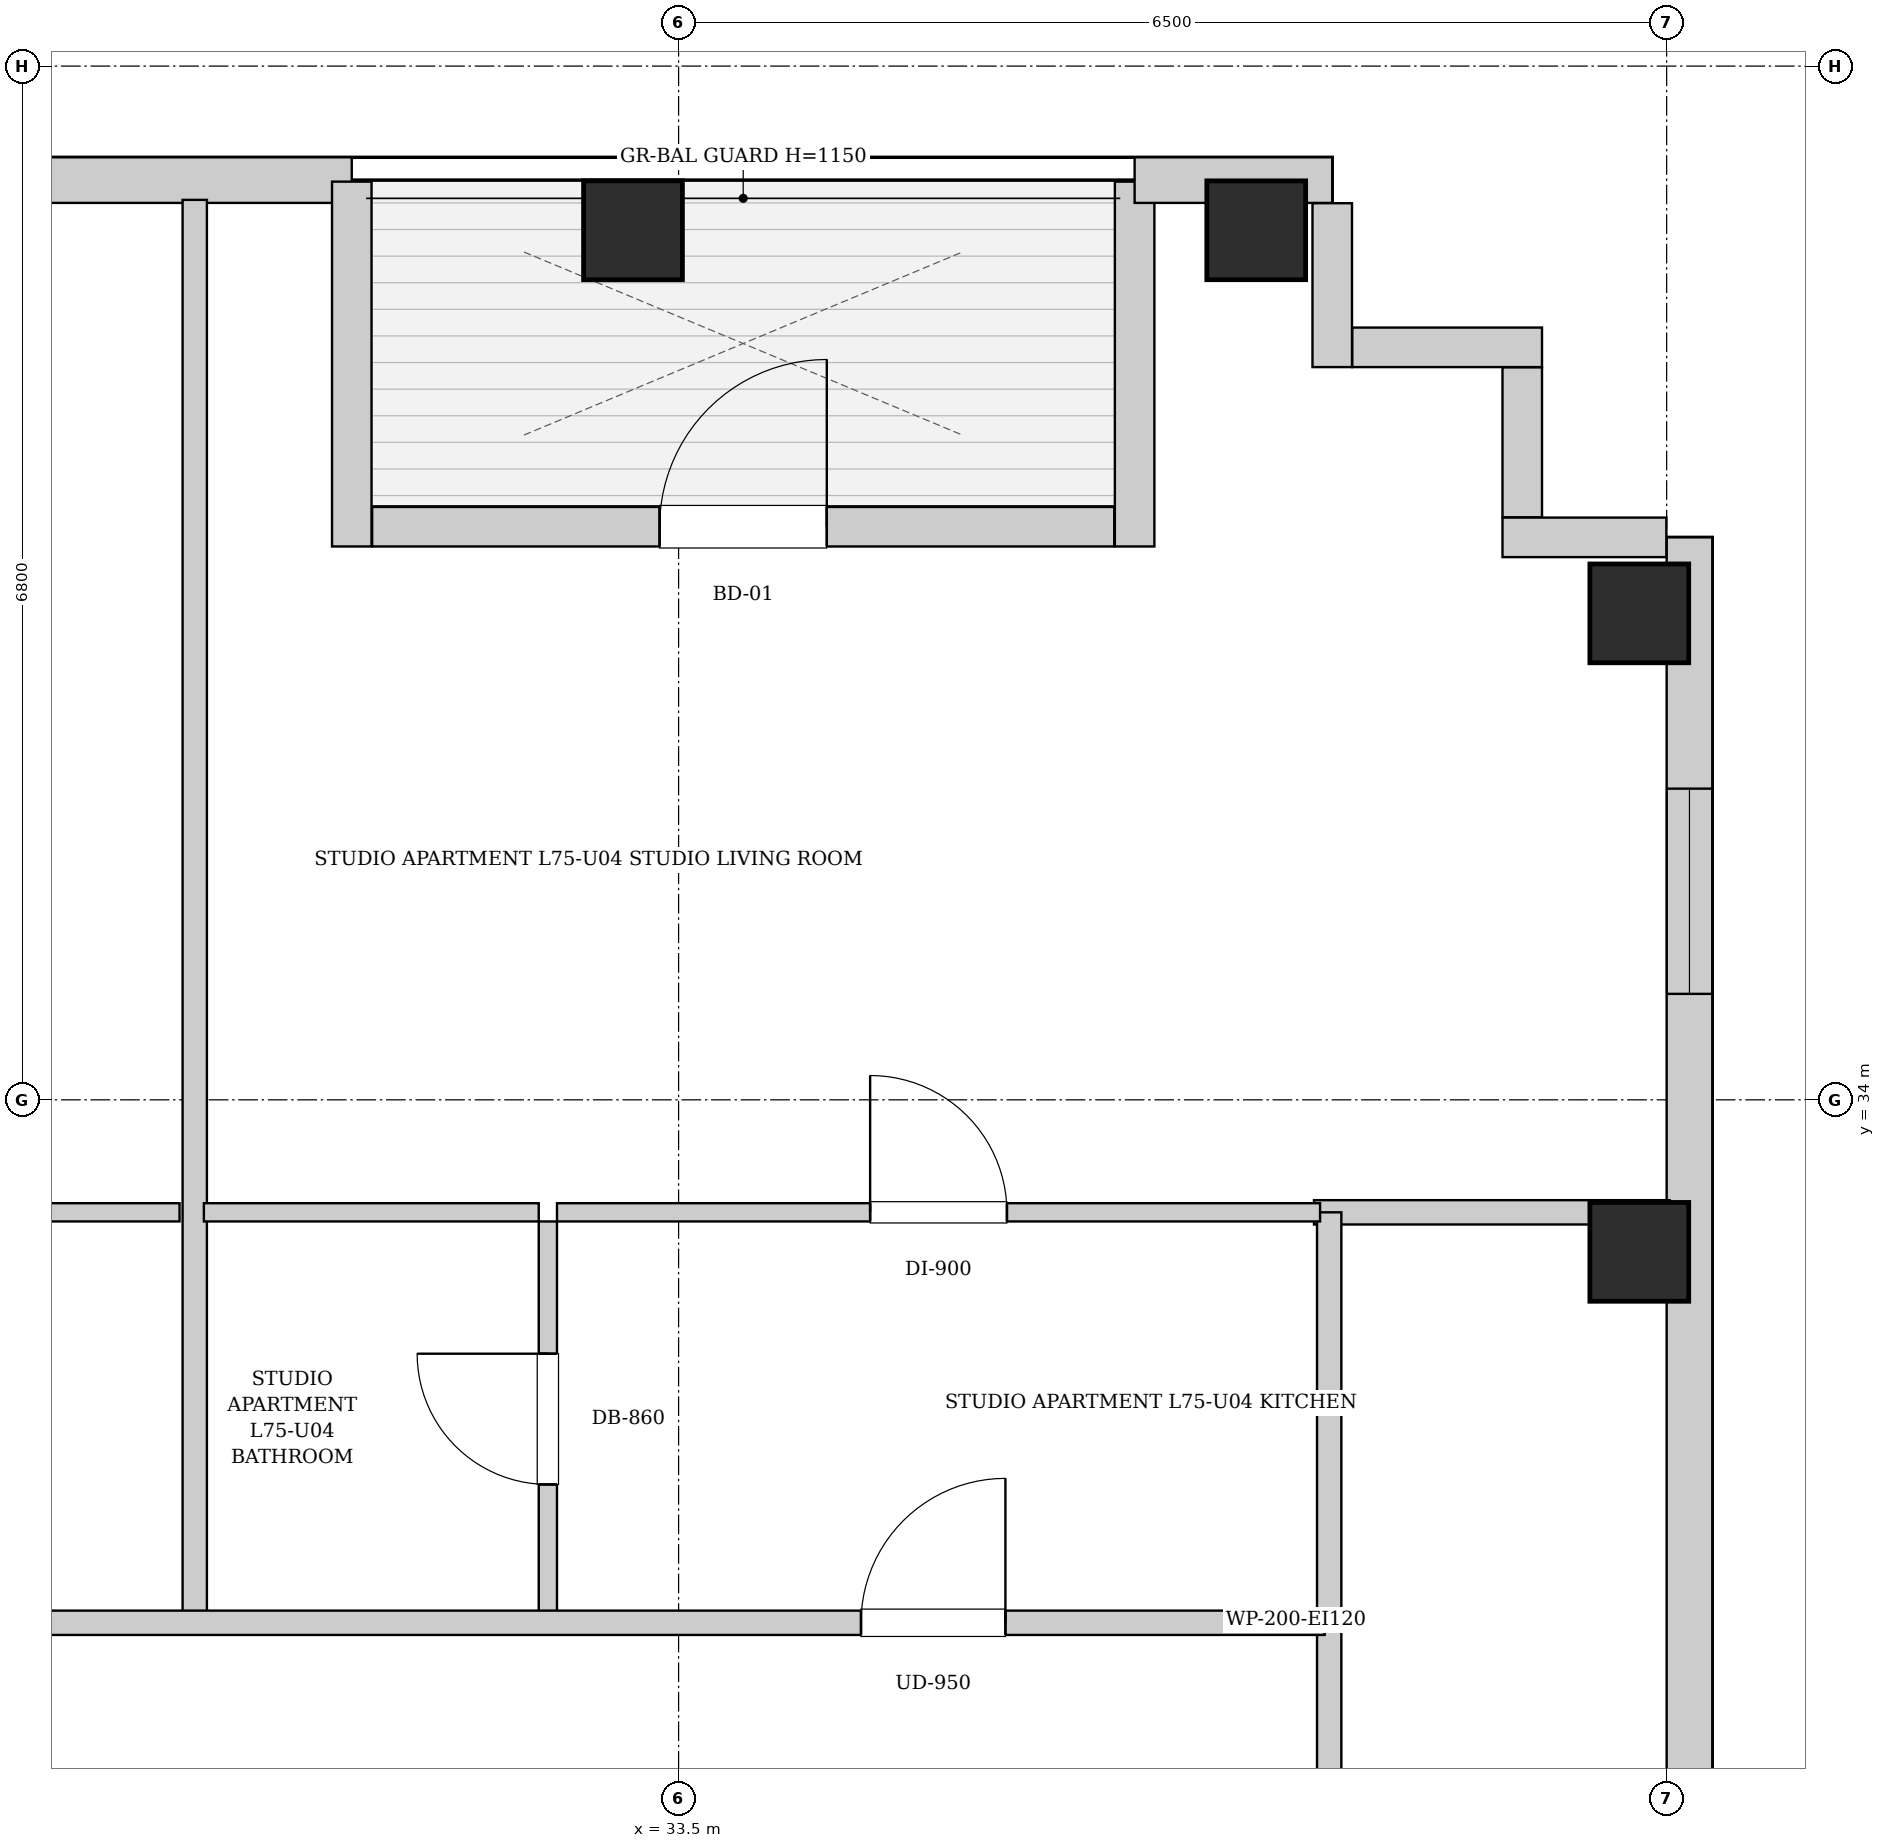
"""IFC4 building model, lengths in metres.
Left out: names, types, materials, properties, quantities, classifications, styles, units other than length and angle.
Written with IfcOpenShell. Run it as: python <this file> out.ifc"""

import sys

from ifc_helpers import new_model, si_unit, direction, frame, frame_2d, origin, origin_2d, place, context, subcontext, project, spatial, rectangle, extrude, element, fill, save


model = new_model("IFC4")
c1 = context("Model", 3, precision=1e-05, world=origin(), true_north=direction((0.0, 1.0)))
c2 = subcontext(c1, "Body", "Model", "MODEL_VIEW")
j1 = project(units=[si_unit("LENGTHUNIT", "METRE"), si_unit("PLANEANGLEUNIT", "RADIAN")], contexts=[c1])
p1 = place(None, origin())
s1 = spatial("IfcSite", under=j1, at=p1, CompositionType="ELEMENT")
p2 = place(p1, origin())
s2 = spatial("IfcBuilding", under=s1, at=p2, CompositionType="ELEMENT")
p3 = place(p2, frame((0.0, 0.0, 258.1)))
s3 = spatial("IfcBuildingStorey", under=s2, at=p3, CompositionType="ELEMENT", Elevation=258.1)
for number, where, z_axis, x_axis in (
    (1, (33.2, 39.72, 0.0), (0.0, 0.0, 1.0), (1.0, 0.0, 0.0)),
    (2, (37.3, 39.72, 0.0), (0.0, 0.0, 1.0), (1.0, 0.0, 0.0)),
    (3, (39.82, 33.0, 0.0), (0.0, 0.0, 1.0), (1.0, 0.0, 0.0)),
    (4, (39.82, 37.2, 0.0), (0.0, 0.0, 1.0), (1.0, 0.0, 0.0)),
):
    element("IfcColumn", number, at=place(p3, frame(where, z_axis=z_axis, x_axis=x_axis)), inside=s3, PredefinedType="COLUMN", context=c2, shape_type="SweptSolid", body=[
        extrude(rectangle(XDim=0.65, YDim=0.65, at=origin_2d()), origin(), (0.0, 0.0, 1.0), 3.4),
    ])
p4 = place(p3, frame((13.1, 40.05, 0.0), z_axis=(0.0, 0.0, 1.0), x_axis=(1.0, 0.0, 0.0)))
e5 = element("IfcWall", 5, at=p4, inside=s3, PredefinedType="SOLIDWALL", context=c2, shape_type="SweptSolid", body=[
    extrude(rectangle(XDim=18.25, YDim=0.3, at=frame_2d((9.125, 0.0))), origin(), (0.0, 0.0, 1.0), 3.05),
])
p5 = place(p4, frame((1.813, 0.0, 0.55)))
e6 = element("IfcOpeningElement", 6, at=p5, cuts=e5, PredefinedType="OPENING", context=c2, shape_type="SweptSolid", body=[
    extrude(rectangle(XDim=1.35, YDim=1.2, at=frame_2d((0.675, 0.6))), frame((0.0, 0.16, 0.0), z_axis=(0.0, -1.0, 0.0), x_axis=(1.0, 0.0, 0.0)), (0.0, 0.0, 1.0), 0.32),
])
p6 = place(p4, frame((5.66, 0.0, 0.55)))
e7 = element("IfcOpeningElement", 7, at=p6, cuts=e5, PredefinedType="OPENING", context=c2, shape_type="SweptSolid", body=[
    extrude(rectangle(XDim=1.35, YDim=1.2, at=frame_2d((0.675, 0.6))), frame((0.0, 0.16, 0.0), z_axis=(0.0, -1.0, 0.0), x_axis=(1.0, 0.0, 0.0)), (0.0, 0.0, 1.0), 0.32),
])
p7 = place(p4, frame((8.55, 0.0, 0.55)))
e8 = element("IfcOpeningElement", 8, at=p7, cuts=e5, PredefinedType="OPENING", context=c2, shape_type="SweptSolid", body=[
    extrude(rectangle(XDim=0.85, YDim=1.2, at=frame_2d((0.425, 0.6))), frame((0.0, 0.16, 0.0), z_axis=(0.0, -1.0, 0.0), x_axis=(1.0, 0.0, 0.0)), (0.0, 0.0, 1.0), 0.32),
])
p8 = place(p4, frame((14.4, 0.0, 0.55)))
e9 = element("IfcOpeningElement", 9, at=p8, cuts=e5, PredefinedType="OPENING", context=c2, shape_type="SweptSolid", body=[
    extrude(rectangle(XDim=1.35, YDim=1.2, at=frame_2d((0.675, 0.6))), frame((0.0, 0.16, 0.0), z_axis=(0.0, -1.0, 0.0), x_axis=(1.0, 0.0, 0.0)), (0.0, 0.0, 1.0), 0.32),
])
p9 = place(p3, frame((31.35, 40.04, 0.0), z_axis=(0.0, 0.0, 1.0), x_axis=(0.0, -1.0, 0.0)))
e10 = element("IfcWall", 10, at=p9, inside=s3, PredefinedType="SOLIDWALL", context=c2, shape_type="SweptSolid", body=[
    extrude(rectangle(XDim=2.4, YDim=0.26, at=frame_2d((1.2, 0.0))), origin(), (0.0, 0.0, 1.0), 3.05),
])
p10 = place(p3, frame((31.484, 37.77, 0.0), z_axis=(0.0, 0.0, 1.0), x_axis=(1.0, 0.0, 0.0)))
e11 = element("IfcWall", 11, at=p10, inside=s3, PredefinedType="SOLIDWALL", context=c2, shape_type="SweptSolid", body=[
    extrude(rectangle(XDim=4.882, YDim=0.26, at=frame_2d((2.441, 0.0))), origin(), (0.0, 0.0, 1.0), 3.05),
])
p11 = place(p10, frame((1.891, 0.0, 0.0)))
e12 = element("IfcOpeningElement", 12, at=p11, cuts=e11, PredefinedType="OPENING", context=c2, shape_type="SweptSolid", body=[
    extrude(rectangle(XDim=1.1, YDim=2.0, at=frame_2d((0.55, 1.0))), frame((0.0, 0.14, 0.0), z_axis=(0.0, -1.0, 0.0), x_axis=(1.0, 0.0, 0.0)), (0.0, 0.0, 1.0), 0.28),
])
p12 = place(p3, frame((36.5, 37.64, 0.0), z_axis=(0.0, 0.0, 1.0), x_axis=(0.0, 1.0, 0.0)))
e13 = element("IfcWall", 13, at=p12, inside=s3, PredefinedType="SOLIDWALL", context=c2, shape_type="SweptSolid", body=[
    extrude(rectangle(XDim=2.4, YDim=0.26, at=frame_2d((1.2, 0.0))), origin(), (0.0, 0.0, 1.0), 3.05),
])
p13 = place(p3, frame((36.5, 40.05, 0.0), z_axis=(0.0, 0.0, 1.0), x_axis=(1.0, 0.0, 0.0)))
e14 = element("IfcWall", 14, at=p13, inside=s3, PredefinedType="SOLIDWALL", context=c2, shape_type="SweptSolid", body=[
    extrude(rectangle(XDim=1.3, YDim=0.3, at=frame_2d((0.65, 0.0))), origin(), (0.0, 0.0, 1.0), 3.05),
])
p14 = place(p3, frame((40.15, 37.7, 0.0), z_axis=(0.0, 0.0, 1.0), x_axis=(0.0, -1.0, 0.0)))
e15 = element("IfcWall", 15, at=p14, inside=s3, PredefinedType="SOLIDWALL", context=c2, shape_type="SweptSolid", body=[
    extrude(rectangle(XDim=31.4, YDim=0.3, at=frame_2d((15.7, 0.0))), origin(), (0.0, 0.0, 1.0), 3.05),
])
p15 = place(p14, frame((28.396, 0.0, 0.55)))
e16 = element("IfcOpeningElement", 16, at=p15, cuts=e15, PredefinedType="OPENING", context=c2, shape_type="SweptSolid", body=[
    extrude(rectangle(XDim=1.35, YDim=1.2, at=frame_2d((0.675, 0.6))), frame((0.0, 0.16, 0.0), z_axis=(0.0, -1.0, 0.0), x_axis=(1.0, 0.0, 0.0)), (0.0, 0.0, 1.0), 0.32),
])
p16 = place(p14, frame((1.653, 0.0, 0.55)))
e17 = element("IfcOpeningElement", 17, at=p16, cuts=e15, PredefinedType="OPENING", context=c2, shape_type="SweptSolid", body=[
    extrude(rectangle(XDim=1.35, YDim=1.2, at=frame_2d((0.675, 0.6))), frame((0.0, 0.16, 0.0), z_axis=(0.0, -1.0, 0.0), x_axis=(1.0, 0.0, 0.0)), (0.0, 0.0, 1.0), 0.32),
])
p17 = place(p14, frame((19.683, 0.0, 0.55)))
e18 = element("IfcOpeningElement", 18, at=p17, cuts=e15, PredefinedType="OPENING", context=c2, shape_type="SweptSolid", body=[
    extrude(rectangle(XDim=1.35, YDim=1.2, at=frame_2d((0.675, 0.6))), frame((0.0, 0.16, 0.0), z_axis=(0.0, -1.0, 0.0), x_axis=(1.0, 0.0, 0.0)), (0.0, 0.0, 1.0), 0.32),
])
p18 = place(p14, frame((10.367, 0.0, 0.55)))
e19 = element("IfcOpeningElement", 19, at=p18, cuts=e15, PredefinedType="OPENING", context=c2, shape_type="SweptSolid", body=[
    extrude(rectangle(XDim=1.35, YDim=1.2, at=frame_2d((0.675, 0.6))), frame((0.0, 0.16, 0.0), z_axis=(0.0, -1.0, 0.0), x_axis=(1.0, 0.0, 0.0)), (0.0, 0.0, 1.0), 0.32),
])
p19 = place(p3, frame((37.8, 39.898, 0.0), z_axis=(0.0, 0.0, 1.0), x_axis=(0.0, -1.0, 0.0)))
e20 = element("IfcWall", 20, at=p19, inside=s3, PredefinedType="SOLIDWALL", context=c2, shape_type="SweptSolid", body=[
    extrude(rectangle(XDim=1.078, YDim=0.26, at=frame_2d((0.539, 0.0))), origin(), (0.0, 0.0, 1.0), 3.05),
])
p20 = place(p3, frame((37.932, 38.95, 0.0), z_axis=(0.0, 0.0, 1.0), x_axis=(1.0, 0.0, 0.0)))
e21 = element("IfcWall", 21, at=p20, inside=s3, PredefinedType="SOLIDWALL", context=c2, shape_type="SweptSolid", body=[
    extrude(rectangle(XDim=1.248, YDim=0.26, at=frame_2d((0.624, 0.0))), origin(), (0.0, 0.0, 1.0), 3.05),
])
p21 = place(p3, frame((39.05, 38.818, 0.0), z_axis=(0.0, 0.0, 1.0), x_axis=(0.0, -1.0, 0.0)))
e22 = element("IfcWall", 22, at=p21, inside=s3, PredefinedType="SOLIDWALL", context=c2, shape_type="SweptSolid", body=[
    extrude(rectangle(XDim=0.986, YDim=0.26, at=frame_2d((0.493, 0.0))), origin(), (0.0, 0.0, 1.0), 3.05),
])
p22 = place(p3, frame((38.92, 37.7, 0.0), z_axis=(0.0, 0.0, 1.0), x_axis=(1.0, 0.0, 0.0)))
e23 = element("IfcWall", 23, at=p22, inside=s3, PredefinedType="SOLIDWALL", context=c2, shape_type="SweptSolid", body=[
    extrude(rectangle(XDim=1.078, YDim=0.26, at=frame_2d((0.539, 0.0))), origin(), (0.0, 0.0, 1.0), 3.05),
])
p23 = place(p3, frame((37.78, 28.98, 0.0), z_axis=(0.0, 0.0, 1.0), x_axis=(0.0, 1.0, 0.0)))
e24 = element("IfcWall", 24, at=p23, inside=s3, PredefinedType="PARTITIONING", context=c2, shape_type="SweptSolid", body=[
    extrude(rectangle(XDim=1.58, YDim=0.16, at=frame_2d((0.79, 0.0))), origin(), (0.0, 0.0, 1.0), 3.05),
])
p24 = place(p3, frame((26.7, 33.26, 0.0), z_axis=(0.0, 0.0, 1.0), x_axis=(1.0, 0.0, 0.0)))
e25 = element("IfcWall", 25, at=p24, inside=s3, PredefinedType="PARTITIONING", context=c2, shape_type="SweptSolid", body=[
    extrude(rectangle(XDim=3.517, YDim=0.12, at=frame_2d((1.759, 0.0))), origin(), (0.0, 0.0, 1.0), 3.05),
])
p25 = place(p24, frame((1.308, 0.0, 0.0)))
e26 = element("IfcOpeningElement", 26, at=p25, cuts=e25, PredefinedType="OPENING", context=c2, shape_type="SweptSolid", body=[
    extrude(rectangle(XDim=0.9, YDim=2.05, at=frame_2d((0.45, 1.025))), frame((0.0, 0.07, 0.0), z_axis=(0.0, -1.0, 0.0), x_axis=(1.0, 0.0, 0.0)), (0.0, 0.0, 1.0), 0.14),
])
p26 = place(p3, frame((37.68, 33.26, 0.0), z_axis=(0.0, 0.0, 1.0), x_axis=(1.0, 0.0, 0.0)))
e27 = element("IfcWall", 27, at=p26, inside=s3, PredefinedType="PARTITIONING", context=c2, shape_type="SweptSolid", body=[
    extrude(rectangle(XDim=2.34, YDim=0.16, at=frame_2d((1.17, 0.0))), origin(), (0.0, 0.0, 1.0), 3.05),
])
p27 = place(p3, frame((37.78, 30.6, 0.0), z_axis=(0.0, 0.0, 1.0), x_axis=(0.0, 1.0, 0.0)))
e28 = element("IfcWall", 28, at=p27, inside=s3, PredefinedType="PARTITIONING", context=c2, shape_type="SweptSolid", body=[
    extrude(rectangle(XDim=2.66, YDim=0.16, at=frame_2d((1.33, 0.0))), origin(), (0.0, 0.0, 1.0), 3.05),
])
p28 = place(p3, frame((30.317, 30.6, 0.0), z_axis=(0.0, 0.0, 1.0), x_axis=(0.0, 1.0, 0.0)))
e29 = element("IfcWall", 29, at=p28, inside=s3, PredefinedType="PARTITIONING", context=c2, shape_type="SweptSolid", body=[
    extrude(rectangle(XDim=9.32, YDim=0.16, at=frame_2d((4.66, 0.0))), origin(), (0.0, 0.0, 1.0), 3.05),
])
p29 = place(p3, frame((32.64, 30.6, 0.0), z_axis=(0.0, 0.0, 1.0), x_axis=(0.0, 1.0, 0.0)))
e30 = element("IfcWall", 30, at=p29, inside=s3, PredefinedType="PARTITIONING", context=c2, shape_type="SweptSolid", body=[
    extrude(rectangle(XDim=2.6, YDim=0.12, at=frame_2d((1.3, 0.0))), origin(), (0.0, 0.0, 1.0), 3.05),
])
p30 = place(p29, frame((0.87, 0.0, 0.0)))
e31 = element("IfcOpeningElement", 31, at=p30, cuts=e30, PredefinedType="OPENING", context=c2, shape_type="SweptSolid", body=[
    extrude(rectangle(XDim=0.86, YDim=2.05, at=frame_2d((0.43, 1.025))), frame((0.0, 0.07, 0.0), z_axis=(0.0, -1.0, 0.0), x_axis=(1.0, 0.0, 0.0)), (0.0, 0.0, 1.0), 0.14),
])
p31 = place(p3, frame((30.377, 33.26, 0.0), z_axis=(0.0, 0.0, 1.0), x_axis=(1.0, 0.0, 0.0)))
e32 = element("IfcWall", 32, at=p31, inside=s3, PredefinedType="PARTITIONING", context=c2, shape_type="SweptSolid", body=[
    extrude(rectangle(XDim=2.203, YDim=0.12, at=frame_2d((1.102, 0.0))), origin(), (0.0, 0.0, 1.0), 3.05),
])
p32 = place(p3, frame((32.7, 33.26, 0.0), z_axis=(0.0, 0.0, 1.0), x_axis=(1.0, 0.0, 0.0)))
e33 = element("IfcWall", 33, at=p32, inside=s3, PredefinedType="PARTITIONING", context=c2, shape_type="SweptSolid", body=[
    extrude(rectangle(XDim=5.02, YDim=0.12, at=frame_2d((2.51, 0.0))), origin(), (0.0, 0.0, 1.0), 3.05),
])
p33 = place(p32, frame((2.06, 0.0, 0.0)))
e34 = element("IfcOpeningElement", 34, at=p33, cuts=e33, PredefinedType="OPENING", context=c2, shape_type="SweptSolid", body=[
    extrude(rectangle(XDim=0.9, YDim=2.05, at=frame_2d((0.45, 1.025))), frame((0.0, 0.07, 0.0), z_axis=(0.0, -1.0, 0.0), x_axis=(1.0, 0.0, 0.0)), (0.0, 0.0, 1.0), 0.14),
])
p34 = place(p3, frame((13.15, 30.56, 0.0), z_axis=(0.0, 0.0, 1.0), x_axis=(1.0, 0.0, 0.0)))
e35 = element("IfcWall", 35, at=p34, inside=s3, PredefinedType="PARTITIONING", context=c2, shape_type="SweptSolid", body=[
    extrude(rectangle(XDim=24.6, YDim=0.16, at=frame_2d((12.3, 0.0))), origin(), (0.0, 0.0, 1.0), 3.05),
])
p35 = place(p34, frame((3.165, 0.0, 0.0)))
e36 = element("IfcOpeningElement", 36, at=p35, cuts=e35, PredefinedType="OPENING", context=c2, shape_type="SweptSolid", body=[
    extrude(rectangle(XDim=0.95, YDim=2.1, at=frame_2d((0.475, 1.05))), frame((0.0, 0.09, 0.0), z_axis=(0.0, -1.0, 0.0), x_axis=(1.0, 0.0, 0.0)), (0.0, 0.0, 1.0), 0.18),
])
p36 = place(p34, frame((21.55, 0.0, 0.0)))
e37 = element("IfcOpeningElement", 37, at=p36, cuts=e35, PredefinedType="OPENING", context=c2, shape_type="SweptSolid", body=[
    extrude(rectangle(XDim=0.95, YDim=2.1, at=frame_2d((0.475, 1.05))), frame((0.0, 0.09, 0.0), z_axis=(0.0, -1.0, 0.0), x_axis=(1.0, 0.0, 0.0)), (0.0, 0.0, 1.0), 0.18),
])
p37 = place(p30, origin())
e38 = element("IfcDoor", 38, at=p37, inside=s3, OperationType="SINGLE_SWING_RIGHT", PredefinedType="DOOR", context=c2, shape_type="SweptSolid", body=[
    extrude(rectangle(XDim=0.86, YDim=2.05, at=frame_2d((0.43, 1.025))), frame((0.0, 0.025, 0.0), z_axis=(0.0, -1.0, 0.0), x_axis=(1.0, 0.0, 0.0)), (0.0, 0.0, 1.0), 0.05),
])
fill(e31, e38)
p38 = place(p33, origin())
e39 = element("IfcDoor", 39, at=p38, inside=s3, OperationType="SINGLE_SWING_LEFT", PredefinedType="DOOR", context=c2, shape_type="SweptSolid", body=[
    extrude(rectangle(XDim=0.9, YDim=2.05, at=frame_2d((0.45, 1.025))), frame((0.0, 0.025, 0.0), z_axis=(0.0, -1.0, 0.0), x_axis=(1.0, 0.0, 0.0)), (0.0, 0.0, 1.0), 0.05),
])
fill(e34, e39)
p39 = place(p36, origin())
e40 = element("IfcDoor", 40, at=p39, inside=s3, OperationType="SINGLE_SWING_RIGHT", PredefinedType="DOOR", context=c2, shape_type="SweptSolid", body=[
    extrude(rectangle(XDim=0.95, YDim=2.1, at=frame_2d((0.475, 1.05))), frame((0.0, 0.025, 0.0), z_axis=(0.0, -1.0, 0.0), x_axis=(1.0, 0.0, 0.0)), (0.0, 0.0, 1.0), 0.05),
])
fill(e37, e40)
p40 = place(p11, origin())
e41 = element("IfcDoor", 41, at=p40, inside=s3, OperationType="SINGLE_SWING_RIGHT", PredefinedType="DOOR", context=c2, shape_type="SweptSolid", body=[
    extrude(rectangle(XDim=1.1, YDim=2.0, at=frame_2d((0.55, 1.0))), frame((0.0, 0.025, 0.0), z_axis=(0.0, -1.0, 0.0), x_axis=(1.0, 0.0, 0.0)), (0.0, 0.0, 1.0), 0.05),
])
fill(e12, e41)
p41 = place(p16, origin())
e42 = element("IfcWindow", 42, at=p41, inside=s3, PartitioningType="SINGLE_PANEL", PredefinedType="WINDOW", context=c2, shape_type="SweptSolid", body=[
    extrude(rectangle(XDim=1.35, YDim=1.2, at=frame_2d((0.675, 0.6))), frame((0.0, 0.03, 0.0), z_axis=(0.0, -1.0, 0.0), x_axis=(1.0, 0.0, 0.0)), (0.0, 0.0, 1.0), 0.06),
])
fill(e17, e42)
save(model, sys.argv[1])
